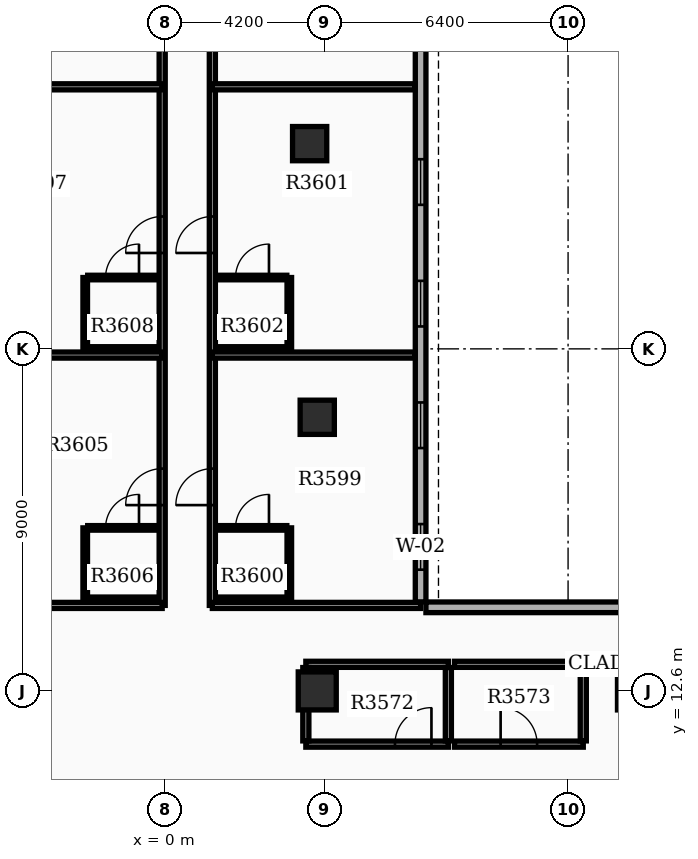
"""IFC4 building model, lengths in metres.
Left out: names, types, materials, properties, quantities, classifications, styles, units other than length and angle.
Written with IfcOpenShell. Run it as: python <this file> out.ifc"""

import sys

from ifc_helpers import new_model, si_unit, direction, frame, frame_2d, origin, origin_2d, place, context, subcontext, project, spatial, rectangle, extrude, element, fill, save


model = new_model("IFC4")
c1 = context("Model", 3, precision=1e-05, world=origin(), true_north=direction((0.0, 1.0)))
c2 = subcontext(c1, "Body", "Model", "MODEL_VIEW")
j1 = project(units=[si_unit("LENGTHUNIT", "METRE"), si_unit("PLANEANGLEUNIT", "RADIAN")], contexts=[c1])
p1 = place(None, origin())
s1 = spatial("IfcSite", under=j1, at=p1, CompositionType="ELEMENT")
p2 = place(p1, origin())
s2 = spatial("IfcBuilding", under=s1, at=p2, CompositionType="ELEMENT")
p3 = place(p2, frame((0.0, 0.0, 224.7)))
s3 = spatial("IfcBuildingStorey", under=s2, at=p3, CompositionType="ELEMENT", Elevation=224.7)
for number, where, z_axis, x_axis in (
    (1, (12.4, 12.6, 0.0), (0.0, 0.0, 1.0), (1.0, 0.0, 0.0)),
    (2, (4.0, 12.6, 0.0), (0.0, 0.0, 1.0), (1.0, 0.0, 0.0)),
):
    element("IfcColumn", number, at=place(p3, frame(where, z_axis=z_axis, x_axis=x_axis)), inside=s3, PredefinedType="COLUMN", context=c2, shape_type="SweptSolid", body=[
        extrude(rectangle(XDim=1.0, YDim=1.0, at=origin_2d()), origin(), (0.0, 0.0, 1.0), 3.9),
    ])
for number, where, z_axis, x_axis in (
    (3, (4.0, 19.8, 0.0), (0.0, 0.0, 1.0), (1.0, 0.0, 0.0)),
    (4, (3.8, 27.0, 0.0), (0.0, 0.0, 1.0), (1.0, 0.0, 0.0)),
):
    element("IfcColumn", number, at=place(p3, frame(where, z_axis=z_axis, x_axis=x_axis)), inside=s3, PredefinedType="COLUMN", context=c2, shape_type="SweptSolid", body=[
        extrude(rectangle(XDim=0.9, YDim=0.9, at=origin_2d()), origin(), (0.0, 0.0, 1.0), 3.9),
    ])
p4 = place(p3, frame((6.72, 14.94, 0.0), z_axis=(0.0, 0.0, 1.0), x_axis=(0.0, 1.0, 0.0)))
e5 = element("IfcWall", 5, at=p4, inside=s3, PredefinedType="STANDARD", context=c2, shape_type="SweptSolid", body=[
    extrude(rectangle(XDim=20.1, YDim=0.28, at=frame_2d((10.05, 0.0))), origin(), (0.0, 0.0, 1.0), 3.18),
])
p5 = place(p4, frame((0.85, 0.0, 0.8)))
e6 = element("IfcOpeningElement", 6, at=p5, cuts=e5, PredefinedType="OPENING", context=c2, shape_type="SweptSolid", body=[
    extrude(rectangle(XDim=1.2, YDim=1.6, at=frame_2d((0.6, 0.8))), frame((0.0, 0.15, 0.0), z_axis=(0.0, -1.0, 0.0), x_axis=(1.0, 0.0, 0.0)), (0.0, 0.0, 1.0), 0.3),
])
p6 = place(p4, frame((4.05, 0.0, 0.8)))
e7 = element("IfcOpeningElement", 7, at=p6, cuts=e5, PredefinedType="OPENING", context=c2, shape_type="SweptSolid", body=[
    extrude(rectangle(XDim=1.2, YDim=1.6, at=frame_2d((0.6, 0.8))), frame((0.0, 0.15, 0.0), z_axis=(0.0, -1.0, 0.0), x_axis=(1.0, 0.0, 0.0)), (0.0, 0.0, 1.0), 0.3),
])
p7 = place(p4, frame((7.25, 0.0, 0.8)))
e8 = element("IfcOpeningElement", 8, at=p7, cuts=e5, PredefinedType="OPENING", context=c2, shape_type="SweptSolid", body=[
    extrude(rectangle(XDim=1.2, YDim=1.6, at=frame_2d((0.6, 0.8))), frame((0.0, 0.15, 0.0), z_axis=(0.0, -1.0, 0.0), x_axis=(1.0, 0.0, 0.0)), (0.0, 0.0, 1.0), 0.3),
])
p8 = place(p4, frame((10.45, 0.0, 0.8)))
e9 = element("IfcOpeningElement", 9, at=p8, cuts=e5, PredefinedType="OPENING", context=c2, shape_type="SweptSolid", body=[
    extrude(rectangle(XDim=1.2, YDim=1.6, at=frame_2d((0.6, 0.8))), frame((0.0, 0.15, 0.0), z_axis=(0.0, -1.0, 0.0), x_axis=(1.0, 0.0, 0.0)), (0.0, 0.0, 1.0), 0.3),
])
p9 = place(p3, frame((13.16, 14.8, 0.0), z_axis=(0.0, 0.0, 1.0), x_axis=(-1.0, 0.0, 0.0)))
e10 = element("IfcWall", 10, at=p9, inside=s3, PredefinedType="STANDARD", context=c2, shape_type="SweptSolid", body=[
    extrude(rectangle(XDim=6.3, YDim=0.28, at=frame_2d((3.15, 0.0))), origin(), (0.0, 0.0, 1.0), 3.18),
])
p10 = place(p3, frame((3.7, 11.2, 0.0), z_axis=(0.0, 0.0, 1.0), x_axis=(1.0, 0.0, 0.0)))
e11 = element("IfcWall", 11, at=p10, inside=s3, PredefinedType="PARTITIONING", context=c2, shape_type="SweptSolid", body=[
    extrude(rectangle(XDim=3.75, YDim=0.16, at=frame_2d((1.875, 0.0))), origin(), (0.0, 0.0, 1.0), 3.17),
])
p11 = place(p10, frame((2.345, 0.0, 0.0)))
e12 = element("IfcOpeningElement", 12, at=p11, cuts=e11, PredefinedType="OPENING", context=c2, shape_type="SweptSolid", body=[
    extrude(rectangle(XDim=0.96, YDim=2.15, at=frame_2d((0.48, 1.075))), frame((0.0, 0.09, 0.0), z_axis=(0.0, -1.0, 0.0), x_axis=(1.0, 0.0, 0.0)), (0.0, 0.0, 1.0), 0.18),
])
p12 = place(p3, frame((3.7, 13.3, 0.0), z_axis=(0.0, 0.0, 1.0), x_axis=(1.0, 0.0, 0.0)))
e13 = element("IfcWall", 13, at=p12, inside=s3, PredefinedType="PARTITIONING", context=c2, shape_type="SweptSolid", body=[
    extrude(rectangle(XDim=3.75, YDim=0.16, at=frame_2d((1.875, 0.0))), origin(), (0.0, 0.0, 1.0), 3.17),
])
for number, where, z_axis, x_axis in (
    (14, (3.7, 11.285, 0.0), (0.0, 0.0, 1.0), (0.0, 1.0, 0.0)),
    (15, (7.45, 11.285, 0.0), (0.0, 0.0, 1.0), (0.0, 1.0, 0.0)),
):
    element("IfcWall", number, at=place(p3, frame(where, z_axis=z_axis, x_axis=x_axis)), inside=s3, PredefinedType="PARTITIONING", context=c2, shape_type="SweptSolid", body=[
        extrude(rectangle(XDim=1.93, YDim=0.16, at=frame_2d((0.965, 0.0))), origin(), (0.0, 0.0, 1.0), 3.17),
    ])
p13 = place(p3, frame((7.61, 11.2, 0.0), z_axis=(0.0, 0.0, 1.0), x_axis=(1.0, 0.0, 0.0)))
e16 = element("IfcWall", 16, at=p13, inside=s3, PredefinedType="PARTITIONING", context=c2, shape_type="SweptSolid", body=[
    extrude(rectangle(XDim=3.39, YDim=0.16, at=frame_2d((1.695, 0.0))), origin(), (0.0, 0.0, 1.0), 3.17),
])
p14 = place(p13, frame((1.215, 0.0, 0.0)))
e17 = element("IfcOpeningElement", 17, at=p14, cuts=e16, PredefinedType="OPENING", context=c2, shape_type="SweptSolid", body=[
    extrude(rectangle(XDim=0.96, YDim=2.15, at=frame_2d((0.48, 1.075))), frame((0.0, 0.09, 0.0), z_axis=(0.0, -1.0, 0.0), x_axis=(1.0, 0.0, 0.0)), (0.0, 0.0, 1.0), 0.18),
])
p15 = place(p3, frame((7.61, 13.3, 0.0), z_axis=(0.0, 0.0, 1.0), x_axis=(1.0, 0.0, 0.0)))
e18 = element("IfcWall", 18, at=p15, inside=s3, PredefinedType="PARTITIONING", context=c2, shape_type="SweptSolid", body=[
    extrude(rectangle(XDim=3.39, YDim=0.16, at=frame_2d((1.695, 0.0))), origin(), (0.0, 0.0, 1.0), 3.17),
])
p16 = place(p3, frame((11.0, 11.285, 0.0), z_axis=(0.0, 0.0, 1.0), x_axis=(0.0, 1.0, 0.0)))
e19 = element("IfcWall", 19, at=p16, inside=s3, PredefinedType="PARTITIONING", context=c2, shape_type="SweptSolid", body=[
    extrude(rectangle(XDim=1.93, YDim=0.16, at=frame_2d((0.965, 0.0))), origin(), (0.0, 0.0, 1.0), 3.17),
])
p17 = place(p3, frame((1.24, 14.85, 0.0), z_axis=(0.0, 0.0, 1.0), x_axis=(0.0, 1.0, 0.0)))
e20 = element("IfcWall", 20, at=p17, inside=s3, PredefinedType="PARTITIONING", context=c2, shape_type="SweptSolid", body=[
    extrude(rectangle(XDim=20.182, YDim=0.16, at=frame_2d((10.091, 0.0))), origin(), (0.0, 0.0, 1.0), 3.17),
])
p18 = place(p17, frame((2.639, 0.0, 0.0)))
e21 = element("IfcOpeningElement", 21, at=p18, cuts=e20, PredefinedType="OPENING", context=c2, shape_type="SweptSolid", body=[
    extrude(rectangle(XDim=0.96, YDim=2.15, at=frame_2d((0.48, 1.075))), frame((0.0, 0.09, 0.0), z_axis=(0.0, -1.0, 0.0), x_axis=(1.0, 0.0, 0.0)), (0.0, 0.0, 1.0), 0.18),
])
p19 = place(p17, frame((9.273, 0.0, 0.0)))
e22 = element("IfcOpeningElement", 22, at=p19, cuts=e20, PredefinedType="OPENING", context=c2, shape_type="SweptSolid", body=[
    extrude(rectangle(XDim=0.96, YDim=2.15, at=frame_2d((0.48, 1.075))), frame((0.0, 0.09, 0.0), z_axis=(0.0, -1.0, 0.0), x_axis=(1.0, 0.0, 0.0)), (0.0, 0.0, 1.0), 0.18),
])
p20 = place(p17, frame((16.614, 0.0, 0.0)))
e23 = element("IfcOpeningElement", 23, at=p20, cuts=e20, PredefinedType="OPENING", context=c2, shape_type="SweptSolid", body=[
    extrude(rectangle(XDim=0.96, YDim=2.15, at=frame_2d((0.48, 1.075))), frame((0.0, 0.09, 0.0), z_axis=(0.0, -1.0, 0.0), x_axis=(1.0, 0.0, 0.0)), (0.0, 0.0, 1.0), 0.18),
])
p21 = place(p3, frame((1.24, 14.85, 0.0), z_axis=(0.0, 0.0, 1.0), x_axis=(1.0, 0.0, 0.0)))
e24 = element("IfcWall", 24, at=p21, inside=s3, PredefinedType="PARTITIONING", context=c2, shape_type="SweptSolid", body=[
    extrude(rectangle(XDim=5.48, YDim=0.16, at=frame_2d((2.74, 0.0))), origin(), (0.0, 0.0, 1.0), 3.17),
])
p22 = place(p3, frame((1.24, 21.437, 0.0), z_axis=(0.0, 0.0, 1.0), x_axis=(1.0, 0.0, 0.0)))
e25 = element("IfcWall", 25, at=p22, inside=s3, PredefinedType="PARTITIONING", context=c2, shape_type="SweptSolid", body=[
    extrude(rectangle(XDim=5.332, YDim=0.16, at=frame_2d((2.666, 0.0))), origin(), (0.0, 0.0, 1.0), 3.17),
])
p23 = place(p3, frame((1.38, 16.89, 0.0), z_axis=(0.0, 0.0, 1.0), x_axis=(1.0, 0.0, 0.0)))
e26 = element("IfcWall", 26, at=p23, inside=s3, PredefinedType="PARTITIONING", context=c2, shape_type="SweptSolid", body=[
    extrude(rectangle(XDim=1.82, YDim=0.12, at=frame_2d((0.91, 0.0))), origin(), (0.0, 0.0, 1.0), 3.17),
])
p24 = place(p23, frame((0.47, 0.0, 0.0)))
e27 = element("IfcOpeningElement", 27, at=p24, cuts=e26, PredefinedType="OPENING", context=c2, shape_type="SweptSolid", body=[
    extrude(rectangle(XDim=0.88, YDim=2.1, at=frame_2d((0.44, 1.05))), frame((0.0, 0.07, 0.0), z_axis=(0.0, -1.0, 0.0), x_axis=(1.0, 0.0, 0.0)), (0.0, 0.0, 1.0), 0.14),
])
p25 = place(p3, frame((1.38, 15.01, 0.0), z_axis=(0.0, 0.0, 1.0), x_axis=(1.0, 0.0, 0.0)))
e28 = element("IfcWall", 28, at=p25, inside=s3, PredefinedType="PARTITIONING", context=c2, shape_type="SweptSolid", body=[
    extrude(rectangle(XDim=1.82, YDim=0.12, at=frame_2d((0.91, 0.0))), origin(), (0.0, 0.0, 1.0), 3.17),
])
p26 = place(p3, frame((3.265, 15.01, 0.0), z_axis=(0.0, 0.0, 1.0), x_axis=(0.0, 1.0, 0.0)))
e29 = element("IfcWall", 29, at=p26, inside=s3, PredefinedType="PARTITIONING", context=c2, shape_type="SweptSolid", body=[
    extrude(rectangle(XDim=1.88, YDim=0.12, at=frame_2d((0.94, 0.0))), origin(), (0.0, 0.0, 1.0), 3.17),
])
p27 = place(p3, frame((1.24, 28.495, 0.0), z_axis=(0.0, 0.0, 1.0), x_axis=(1.0, 0.0, 0.0)))
e30 = element("IfcWall", 30, at=p27, inside=s3, PredefinedType="PARTITIONING", context=c2, shape_type="SweptSolid", body=[
    extrude(rectangle(XDim=5.332, YDim=0.16, at=frame_2d((2.666, 0.0))), origin(), (0.0, 0.0, 1.0), 3.17),
])
p28 = place(p3, frame((1.38, 23.477, 0.0), z_axis=(0.0, 0.0, 1.0), x_axis=(1.0, 0.0, 0.0)))
e31 = element("IfcWall", 31, at=p28, inside=s3, PredefinedType="PARTITIONING", context=c2, shape_type="SweptSolid", body=[
    extrude(rectangle(XDim=1.82, YDim=0.12, at=frame_2d((0.91, 0.0))), origin(), (0.0, 0.0, 1.0), 3.17),
])
p29 = place(p28, frame((0.47, 0.0, 0.0)))
e32 = element("IfcOpeningElement", 32, at=p29, cuts=e31, PredefinedType="OPENING", context=c2, shape_type="SweptSolid", body=[
    extrude(rectangle(XDim=0.88, YDim=2.1, at=frame_2d((0.44, 1.05))), frame((0.0, 0.07, 0.0), z_axis=(0.0, -1.0, 0.0), x_axis=(1.0, 0.0, 0.0)), (0.0, 0.0, 1.0), 0.14),
])
p30 = place(p3, frame((1.38, 21.597, 0.0), z_axis=(0.0, 0.0, 1.0), x_axis=(1.0, 0.0, 0.0)))
e33 = element("IfcWall", 33, at=p30, inside=s3, PredefinedType="PARTITIONING", context=c2, shape_type="SweptSolid", body=[
    extrude(rectangle(XDim=1.82, YDim=0.12, at=frame_2d((0.91, 0.0))), origin(), (0.0, 0.0, 1.0), 3.17),
])
p31 = place(p3, frame((3.265, 21.597, 0.0), z_axis=(0.0, 0.0, 1.0), x_axis=(0.0, 1.0, 0.0)))
e34 = element("IfcWall", 34, at=p31, inside=s3, PredefinedType="PARTITIONING", context=c2, shape_type="SweptSolid", body=[
    extrude(rectangle(XDim=1.88, YDim=0.12, at=frame_2d((0.94, 0.0))), origin(), (0.0, 0.0, 1.0), 3.17),
])
p32 = place(p3, frame((-0.08, 14.85, 0.0), z_axis=(0.0, 0.0, 1.0), x_axis=(0.0, 1.0, 0.0)))
e35 = element("IfcWall", 35, at=p32, inside=s3, PredefinedType="PARTITIONING", context=c2, shape_type="SweptSolid", body=[
    extrude(rectangle(XDim=20.182, YDim=0.16, at=frame_2d((10.091, 0.0))), origin(), (0.0, 0.0, 1.0), 3.17),
])
p33 = place(p32, frame((2.639, 0.0, 0.0)))
e36 = element("IfcOpeningElement", 36, at=p33, cuts=e35, PredefinedType="OPENING", context=c2, shape_type="SweptSolid", body=[
    extrude(rectangle(XDim=0.96, YDim=2.15, at=frame_2d((0.48, 1.075))), frame((0.0, 0.09, 0.0), z_axis=(0.0, -1.0, 0.0), x_axis=(1.0, 0.0, 0.0)), (0.0, 0.0, 1.0), 0.18),
])
p34 = place(p32, frame((9.273, 0.0, 0.0)))
e37 = element("IfcOpeningElement", 37, at=p34, cuts=e35, PredefinedType="OPENING", context=c2, shape_type="SweptSolid", body=[
    extrude(rectangle(XDim=0.96, YDim=2.15, at=frame_2d((0.48, 1.075))), frame((0.0, 0.09, 0.0), z_axis=(0.0, -1.0, 0.0), x_axis=(1.0, 0.0, 0.0)), (0.0, 0.0, 1.0), 0.18),
])
p35 = place(p32, frame((16.614, 0.0, 0.0)))
e38 = element("IfcOpeningElement", 38, at=p35, cuts=e35, PredefinedType="OPENING", context=c2, shape_type="SweptSolid", body=[
    extrude(rectangle(XDim=0.96, YDim=2.15, at=frame_2d((0.48, 1.075))), frame((0.0, 0.09, 0.0), z_axis=(0.0, -1.0, 0.0), x_axis=(1.0, 0.0, 0.0)), (0.0, 0.0, 1.0), 0.18),
])
p36 = place(p3, frame((-0.08, 14.85, 0.0), z_axis=(0.0, 0.0, 1.0), x_axis=(-1.0, 0.0, 0.0)))
e39 = element("IfcWall", 39, at=p36, inside=s3, PredefinedType="PARTITIONING", context=c2, shape_type="SweptSolid", body=[
    extrude(rectangle(XDim=6.64, YDim=0.16, at=frame_2d((3.32, 0.0))), origin(), (0.0, 0.0, 1.0), 3.17),
])
p37 = place(p3, frame((-0.08, 21.437, 0.0), z_axis=(0.0, 0.0, 1.0), x_axis=(-1.0, 0.0, 0.0)))
e40 = element("IfcWall", 40, at=p37, inside=s3, PredefinedType="PARTITIONING", context=c2, shape_type="SweptSolid", body=[
    extrude(rectangle(XDim=6.492, YDim=0.16, at=frame_2d((3.246, 0.0))), origin(), (0.0, 0.0, 1.0), 3.17),
])
p38 = place(p3, frame((-2.04, 16.89, 0.0), z_axis=(0.0, 0.0, 1.0), x_axis=(1.0, 0.0, 0.0)))
e41 = element("IfcWall", 41, at=p38, inside=s3, PredefinedType="PARTITIONING", context=c2, shape_type="SweptSolid", body=[
    extrude(rectangle(XDim=1.82, YDim=0.12, at=frame_2d((0.91, 0.0))), origin(), (0.0, 0.0, 1.0), 3.17),
])
p39 = place(p38, frame((0.47, 0.0, 0.0)))
e42 = element("IfcOpeningElement", 42, at=p39, cuts=e41, PredefinedType="OPENING", context=c2, shape_type="SweptSolid", body=[
    extrude(rectangle(XDim=0.88, YDim=2.1, at=frame_2d((0.44, 1.05))), frame((0.0, 0.07, 0.0), z_axis=(0.0, -1.0, 0.0), x_axis=(1.0, 0.0, 0.0)), (0.0, 0.0, 1.0), 0.14),
])
p40 = place(p3, frame((-2.04, 15.01, 0.0), z_axis=(0.0, 0.0, 1.0), x_axis=(1.0, 0.0, 0.0)))
e43 = element("IfcWall", 43, at=p40, inside=s3, PredefinedType="PARTITIONING", context=c2, shape_type="SweptSolid", body=[
    extrude(rectangle(XDim=1.82, YDim=0.12, at=frame_2d((0.91, 0.0))), origin(), (0.0, 0.0, 1.0), 3.17),
])
p41 = place(p3, frame((-2.105, 15.01, 0.0), z_axis=(0.0, 0.0, 1.0), x_axis=(0.0, 1.0, 0.0)))
e44 = element("IfcWall", 44, at=p41, inside=s3, PredefinedType="PARTITIONING", context=c2, shape_type="SweptSolid", body=[
    extrude(rectangle(XDim=1.88, YDim=0.12, at=frame_2d((0.94, 0.0))), origin(), (0.0, 0.0, 1.0), 3.17),
])
p42 = place(p3, frame((-0.08, 28.495, 0.0), z_axis=(0.0, 0.0, 1.0), x_axis=(-1.0, 0.0, 0.0)))
e45 = element("IfcWall", 45, at=p42, inside=s3, PredefinedType="PARTITIONING", context=c2, shape_type="SweptSolid", body=[
    extrude(rectangle(XDim=6.492, YDim=0.16, at=frame_2d((3.246, 0.0))), origin(), (0.0, 0.0, 1.0), 3.17),
])
p43 = place(p3, frame((-2.04, 23.477, 0.0), z_axis=(0.0, 0.0, 1.0), x_axis=(1.0, 0.0, 0.0)))
e46 = element("IfcWall", 46, at=p43, inside=s3, PredefinedType="PARTITIONING", context=c2, shape_type="SweptSolid", body=[
    extrude(rectangle(XDim=1.82, YDim=0.12, at=frame_2d((0.91, 0.0))), origin(), (0.0, 0.0, 1.0), 3.17),
])
p44 = place(p43, frame((0.47, 0.0, 0.0)))
e47 = element("IfcOpeningElement", 47, at=p44, cuts=e46, PredefinedType="OPENING", context=c2, shape_type="SweptSolid", body=[
    extrude(rectangle(XDim=0.88, YDim=2.1, at=frame_2d((0.44, 1.05))), frame((0.0, 0.07, 0.0), z_axis=(0.0, -1.0, 0.0), x_axis=(1.0, 0.0, 0.0)), (0.0, 0.0, 1.0), 0.14),
])
p45 = place(p3, frame((-2.04, 21.597, 0.0), z_axis=(0.0, 0.0, 1.0), x_axis=(1.0, 0.0, 0.0)))
e48 = element("IfcWall", 48, at=p45, inside=s3, PredefinedType="PARTITIONING", context=c2, shape_type="SweptSolid", body=[
    extrude(rectangle(XDim=1.82, YDim=0.12, at=frame_2d((0.91, 0.0))), origin(), (0.0, 0.0, 1.0), 3.17),
])
p46 = place(p3, frame((-2.105, 21.597, 0.0), z_axis=(0.0, 0.0, 1.0), x_axis=(0.0, 1.0, 0.0)))
e49 = element("IfcWall", 49, at=p46, inside=s3, PredefinedType="PARTITIONING", context=c2, shape_type="SweptSolid", body=[
    extrude(rectangle(XDim=1.88, YDim=0.12, at=frame_2d((0.94, 0.0))), origin(), (0.0, 0.0, 1.0), 3.17),
])
p47 = place(p5, origin())
e50 = element("IfcWindow", 50, at=p47, inside=s3, PartitioningType="SINGLE_PANEL", PredefinedType="WINDOW", context=c2, shape_type="SweptSolid", body=[
    extrude(rectangle(XDim=1.2, YDim=1.6, at=frame_2d((0.6, 0.8))), frame((0.0, 0.03, 0.0), z_axis=(0.0, -1.0, 0.0), x_axis=(1.0, 0.0, 0.0)), (0.0, 0.0, 1.0), 0.06),
])
fill(e6, e50)
p48 = place(p6, origin())
e51 = element("IfcWindow", 51, at=p48, inside=s3, PartitioningType="SINGLE_PANEL", PredefinedType="WINDOW", context=c2, shape_type="SweptSolid", body=[
    extrude(rectangle(XDim=1.2, YDim=1.6, at=frame_2d((0.6, 0.8))), frame((0.0, 0.03, 0.0), z_axis=(0.0, -1.0, 0.0), x_axis=(1.0, 0.0, 0.0)), (0.0, 0.0, 1.0), 0.06),
])
fill(e7, e51)
p49 = place(p7, origin())
e52 = element("IfcWindow", 52, at=p49, inside=s3, PartitioningType="SINGLE_PANEL", PredefinedType="WINDOW", context=c2, shape_type="SweptSolid", body=[
    extrude(rectangle(XDim=1.2, YDim=1.6, at=frame_2d((0.6, 0.8))), frame((0.0, 0.03, 0.0), z_axis=(0.0, -1.0, 0.0), x_axis=(1.0, 0.0, 0.0)), (0.0, 0.0, 1.0), 0.06),
])
fill(e8, e52)
p50 = place(p8, origin())
e53 = element("IfcWindow", 53, at=p50, inside=s3, PartitioningType="SINGLE_PANEL", PredefinedType="WINDOW", context=c2, shape_type="SweptSolid", body=[
    extrude(rectangle(XDim=1.2, YDim=1.6, at=frame_2d((0.6, 0.8))), frame((0.0, 0.03, 0.0), z_axis=(0.0, -1.0, 0.0), x_axis=(1.0, 0.0, 0.0)), (0.0, 0.0, 1.0), 0.06),
])
fill(e9, e53)
p51 = place(p11, origin())
e54 = element("IfcDoor", 54, at=p51, inside=s3, OperationType="SINGLE_SWING_RIGHT", PredefinedType="DOOR", context=c2, shape_type="SweptSolid", body=[
    extrude(rectangle(XDim=0.96, YDim=2.15, at=frame_2d((0.48, 1.075))), frame((0.0, 0.025, 0.0), z_axis=(0.0, -1.0, 0.0), x_axis=(1.0, 0.0, 0.0)), (0.0, 0.0, 1.0), 0.05),
])
fill(e12, e54)
p52 = place(p14, origin())
e55 = element("IfcDoor", 55, at=p52, inside=s3, OperationType="SINGLE_SWING_LEFT", PredefinedType="DOOR", context=c2, shape_type="SweptSolid", body=[
    extrude(rectangle(XDim=0.96, YDim=2.15, at=frame_2d((0.48, 1.075))), frame((0.0, 0.025, 0.0), z_axis=(0.0, -1.0, 0.0), x_axis=(1.0, 0.0, 0.0)), (0.0, 0.0, 1.0), 0.05),
])
fill(e17, e55)
p53 = place(p18, origin())
e56 = element("IfcDoor", 56, at=p53, inside=s3, OperationType="SINGLE_SWING_LEFT", PredefinedType="DOOR", context=c2, shape_type="SweptSolid", body=[
    extrude(rectangle(XDim=0.96, YDim=2.15, at=frame_2d((0.48, 1.075))), frame((0.0, 0.025, 0.0), z_axis=(0.0, -1.0, 0.0), x_axis=(1.0, 0.0, 0.0)), (0.0, 0.0, 1.0), 0.05),
])
fill(e21, e56)
p54 = place(p24, origin())
e57 = element("IfcDoor", 57, at=p54, inside=s3, OperationType="SINGLE_SWING_RIGHT", PredefinedType="DOOR", context=c2, shape_type="SweptSolid", body=[
    extrude(rectangle(XDim=0.88, YDim=2.1, at=frame_2d((0.44, 1.05))), frame((0.0, 0.025, 0.0), z_axis=(0.0, -1.0, 0.0), x_axis=(1.0, 0.0, 0.0)), (0.0, 0.0, 1.0), 0.05),
])
fill(e27, e57)
p55 = place(p19, origin())
e58 = element("IfcDoor", 58, at=p55, inside=s3, OperationType="SINGLE_SWING_LEFT", PredefinedType="DOOR", context=c2, shape_type="SweptSolid", body=[
    extrude(rectangle(XDim=0.96, YDim=2.15, at=frame_2d((0.48, 1.075))), frame((0.0, 0.025, 0.0), z_axis=(0.0, -1.0, 0.0), x_axis=(1.0, 0.0, 0.0)), (0.0, 0.0, 1.0), 0.05),
])
fill(e22, e58)
p56 = place(p29, origin())
e59 = element("IfcDoor", 59, at=p56, inside=s3, OperationType="SINGLE_SWING_RIGHT", PredefinedType="DOOR", context=c2, shape_type="SweptSolid", body=[
    extrude(rectangle(XDim=0.88, YDim=2.1, at=frame_2d((0.44, 1.05))), frame((0.0, 0.025, 0.0), z_axis=(0.0, -1.0, 0.0), x_axis=(1.0, 0.0, 0.0)), (0.0, 0.0, 1.0), 0.05),
])
fill(e32, e59)
p57 = place(p33, origin())
e60 = element("IfcDoor", 60, at=p57, inside=s3, OperationType="SINGLE_SWING_LEFT", PredefinedType="DOOR", context=c2, shape_type="SweptSolid", body=[
    extrude(rectangle(XDim=0.96, YDim=2.15, at=frame_2d((0.48, 1.075))), frame((0.0, 0.025, 0.0), z_axis=(0.0, -1.0, 0.0), x_axis=(1.0, 0.0, 0.0)), (0.0, 0.0, 1.0), 0.05),
])
fill(e36, e60)
p58 = place(p39, origin())
e61 = element("IfcDoor", 61, at=p58, inside=s3, OperationType="SINGLE_SWING_RIGHT", PredefinedType="DOOR", context=c2, shape_type="SweptSolid", body=[
    extrude(rectangle(XDim=0.88, YDim=2.1, at=frame_2d((0.44, 1.05))), frame((0.0, 0.025, 0.0), z_axis=(0.0, -1.0, 0.0), x_axis=(1.0, 0.0, 0.0)), (0.0, 0.0, 1.0), 0.05),
])
fill(e42, e61)
p59 = place(p34, origin())
e62 = element("IfcDoor", 62, at=p59, inside=s3, OperationType="SINGLE_SWING_LEFT", PredefinedType="DOOR", context=c2, shape_type="SweptSolid", body=[
    extrude(rectangle(XDim=0.96, YDim=2.15, at=frame_2d((0.48, 1.075))), frame((0.0, 0.025, 0.0), z_axis=(0.0, -1.0, 0.0), x_axis=(1.0, 0.0, 0.0)), (0.0, 0.0, 1.0), 0.05),
])
fill(e37, e62)
p60 = place(p44, origin())
e63 = element("IfcDoor", 63, at=p60, inside=s3, OperationType="SINGLE_SWING_RIGHT", PredefinedType="DOOR", context=c2, shape_type="SweptSolid", body=[
    extrude(rectangle(XDim=0.88, YDim=2.1, at=frame_2d((0.44, 1.05))), frame((0.0, 0.025, 0.0), z_axis=(0.0, -1.0, 0.0), x_axis=(1.0, 0.0, 0.0)), (0.0, 0.0, 1.0), 0.05),
])
fill(e47, e63)
save(model, sys.argv[1])
